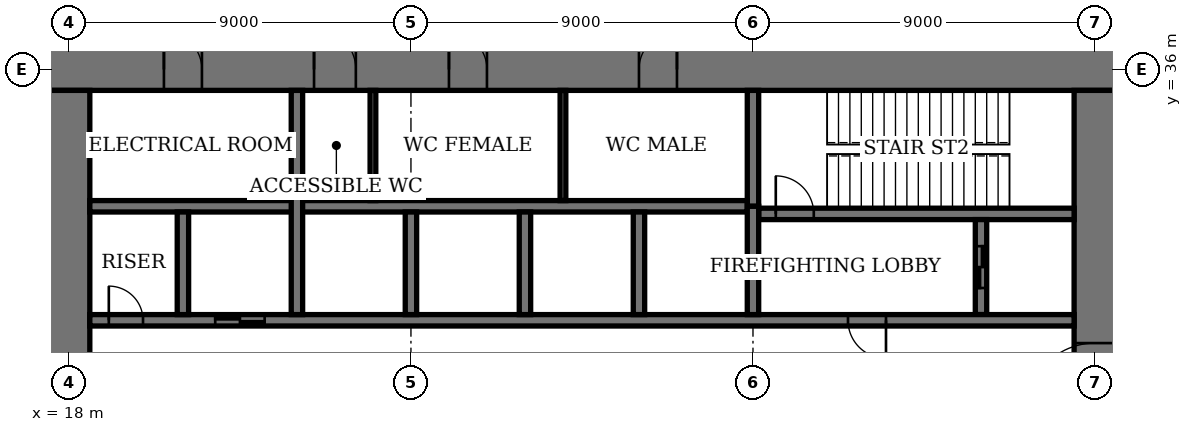
"""IFC4 building model, lengths in metres.
Left out: names, types, materials, properties, quantities, classifications, styles, units other than length and angle.
Written with IfcOpenShell. Run it as: python <this file> out.ifc"""

import sys

from ifc_helpers import new_model, si_unit, direction, frame, frame_2d, origin, place, context, subcontext, project, spatial, rectangle, extrude, element, fill, save


model = new_model("IFC4")
c1 = context("Model", 3, precision=1e-05, world=origin(), true_north=direction((0.0, 1.0)))
c2 = subcontext(c1, "Body", "Model", "MODEL_VIEW")
j1 = project(units=[si_unit("LENGTHUNIT", "METRE"), si_unit("PLANEANGLEUNIT", "RADIAN")], contexts=[c1])
p1 = place(None, origin())
s1 = spatial("IfcSite", under=j1, at=p1, CompositionType="ELEMENT")
p2 = place(p1, origin())
s2 = spatial("IfcBuilding", under=s1, at=p2, CompositionType="ELEMENT")
p3 = place(p2, frame((0.0, 0.0, 80.0)))
s3 = spatial("IfcBuildingStorey", under=s2, at=p3, CompositionType="ELEMENT", Elevation=80.0)
p4 = place(p3, frame((45.55, 36.0, 0.0), z_axis=(0.0, 0.0, 1.0), x_axis=(-1.0, 0.0, 0.0)))
e1 = element("IfcWall", 1, at=p4, inside=s3, PredefinedType="SHEAR", context=c2, shape_type="SweptSolid", body=[
    extrude(rectangle(XDim=28.1, YDim=1.1, at=frame_2d((14.05, 0.0))), origin(), (0.0, 0.0, 1.0), 5.0),
])
p5 = place(p4, frame((11.55, 0.0, 0.0)))
e2 = element("IfcOpeningElement", 2, at=p5, cuts=e1, PredefinedType="OPENING", context=c2, shape_type="SweptSolid", body=[
    extrude(rectangle(XDim=1.0, YDim=2.4, at=frame_2d((0.5, 1.2))), frame((0.0, 0.56, 0.0), z_axis=(0.0, -1.0, 0.0), x_axis=(1.0, 0.0, 0.0)), (0.0, 0.0, 1.0), 1.12),
])
p6 = place(p4, frame((16.55, 0.0, 0.0)))
e3 = element("IfcOpeningElement", 3, at=p6, cuts=e1, PredefinedType="OPENING", context=c2, shape_type="SweptSolid", body=[
    extrude(rectangle(XDim=1.0, YDim=2.4, at=frame_2d((0.5, 1.2))), frame((0.0, 0.56, 0.0), z_axis=(0.0, -1.0, 0.0), x_axis=(1.0, 0.0, 0.0)), (0.0, 0.0, 1.0), 1.12),
])
p7 = place(p4, frame((20.0, 0.0, 0.0)))
e4 = element("IfcOpeningElement", 4, at=p7, cuts=e1, PredefinedType="OPENING", context=c2, shape_type="SweptSolid", body=[
    extrude(rectangle(XDim=1.1, YDim=2.4, at=frame_2d((0.55, 1.2))), frame((0.0, 0.56, 0.0), z_axis=(0.0, -1.0, 0.0), x_axis=(1.0, 0.0, 0.0)), (0.0, 0.0, 1.0), 1.12),
])
p8 = place(p4, frame((24.05, 0.0, 0.0)))
e5 = element("IfcOpeningElement", 5, at=p8, cuts=e1, PredefinedType="OPENING", context=c2, shape_type="SweptSolid", body=[
    extrude(rectangle(XDim=1.0, YDim=2.4, at=frame_2d((0.5, 1.2))), frame((0.0, 0.56, 0.0), z_axis=(0.0, -1.0, 0.0), x_axis=(1.0, 0.0, 0.0)), (0.0, 0.0, 1.0), 1.12),
])
p9 = place(p3, frame((18.0, 35.45, 0.0), z_axis=(0.0, 0.0, 1.0), x_axis=(0.0, -1.0, 0.0)))
e6 = element("IfcWall", 6, at=p9, inside=s3, PredefinedType="SHEAR", context=c2, shape_type="SweptSolid", body=[
    extrude(rectangle(XDim=16.9, YDim=1.1, at=frame_2d((8.45, 0.0))), origin(), (0.0, 0.0, 1.0), 5.0),
])
p10 = place(p9, frame((8.45, 0.0, 0.0)))
e7 = element("IfcOpeningElement", 7, at=p10, cuts=e6, PredefinedType="OPENING", context=c2, shape_type="SweptSolid", body=[
    extrude(rectangle(XDim=1.8, YDim=2.4, at=frame_2d((0.9, 1.2))), frame((0.0, 0.56, 0.0), z_axis=(0.0, -1.0, 0.0), x_axis=(1.0, 0.0, 0.0)), (0.0, 0.0, 1.0), 1.12),
])
p11 = place(p3, frame((45.0, 18.55, 0.0), z_axis=(0.0, 0.0, 1.0), x_axis=(0.0, 1.0, 0.0)))
e8 = element("IfcWall", 8, at=p11, inside=s3, PredefinedType="SHEAR", context=c2, shape_type="SweptSolid", body=[
    extrude(rectangle(XDim=16.9, YDim=1.1, at=frame_2d((8.45, 0.0))), origin(), (0.0, 0.0, 1.0), 5.0),
])
p12 = place(p11, frame((8.45, 0.0, 0.0)))
e9 = element("IfcOpeningElement", 9, at=p12, cuts=e8, PredefinedType="OPENING", context=c2, shape_type="SweptSolid", body=[
    extrude(rectangle(XDim=1.8, YDim=2.4, at=frame_2d((0.9, 1.2))), frame((0.0, 0.56, 0.0), z_axis=(0.0, -1.0, 0.0), x_axis=(1.0, 0.0, 0.0)), (0.0, 0.0, 1.0), 1.12),
])
p13 = place(p3, frame((36.15, 32.2, 0.0), z_axis=(0.0, 0.0, 1.0), x_axis=(1.0, 0.0, 0.0)))
e10 = element("IfcWall", 10, at=p13, inside=s3, PredefinedType="SHEAR", context=c2, shape_type="SweptSolid", body=[
    extrude(rectangle(XDim=8.3, YDim=0.3, at=frame_2d((4.15, 0.0))), origin(), (0.0, 0.0, 1.0), 5.0),
])
p14 = place(p13, frame((0.45, 0.0, 0.0)))
e11 = element("IfcOpeningElement", 11, at=p14, cuts=e10, PredefinedType="OPENING", context=c2, shape_type="SweptSolid", body=[
    extrude(rectangle(XDim=1.0, YDim=2.4, at=frame_2d((0.5, 1.2))), frame((0.0, 0.16, 0.0), z_axis=(0.0, -1.0, 0.0), x_axis=(1.0, 0.0, 0.0)), (0.0, 0.0, 1.0), 0.32),
])
p15 = place(p3, frame((36.0, 32.4, 0.0), z_axis=(0.0, 0.0, 1.0), x_axis=(0.0, 1.0, 0.0)))
e12 = element("IfcWall", 12, at=p15, inside=s3, PredefinedType="SHEAR", context=c2, shape_type="SweptSolid", body=[
    extrude(rectangle(XDim=3.05, YDim=0.3, at=frame_2d((1.525, 0.0))), origin(), (0.0, 0.0, 1.0), 5.0),
])
p16 = place(p3, frame((42.0, 29.55, 0.0), z_axis=(0.0, 0.0, 1.0), x_axis=(0.0, 1.0, 0.0)))
e13 = element("IfcWall", 13, at=p16, inside=s3, PredefinedType="SHEAR", context=c2, shape_type="SweptSolid", body=[
    extrude(rectangle(XDim=2.5, YDim=0.3, at=frame_2d((1.25, 0.0))), origin(), (0.0, 0.0, 1.0), 5.0),
])
p17 = place(p16, frame((0.7, 0.0, 0.0)))
e14 = element("IfcOpeningElement", 14, at=p17, cuts=e13, PredefinedType="OPENING", context=c2, shape_type="SweptSolid", body=[
    extrude(rectangle(XDim=1.1, YDim=2.4, at=frame_2d((0.55, 1.2))), frame((0.0, 0.16, 0.0), z_axis=(0.0, -1.0, 0.0), x_axis=(1.0, 0.0, 0.0)), (0.0, 0.0, 1.0), 0.32),
])
p18 = place(p3, frame((18.55, 29.4, 0.0), z_axis=(0.0, 0.0, 1.0), x_axis=(1.0, 0.0, 0.0)))
e15 = element("IfcWall", 15, at=p18, inside=s3, PredefinedType="SHEAR", context=c2, shape_type="SweptSolid", body=[
    extrude(rectangle(XDim=25.9, YDim=0.3, at=frame_2d((12.95, 0.0))), origin(), (0.0, 0.0, 1.0), 5.0),
])
p19 = place(p18, frame((19.95, 0.0, 0.0)))
e16 = element("IfcOpeningElement", 16, at=p19, cuts=e15, PredefinedType="OPENING", context=c2, shape_type="SweptSolid", body=[
    extrude(rectangle(XDim=1.0, YDim=2.4, at=frame_2d((0.5, 1.2))), frame((0.0, 0.16, 0.0), z_axis=(0.0, -1.0, 0.0), x_axis=(1.0, 0.0, 0.0)), (0.0, 0.0, 1.0), 0.32),
])
p20 = place(p18, frame((0.5, 0.0, 0.0)))
e17 = element("IfcOpeningElement", 17, at=p20, cuts=e15, PredefinedType="OPENING", context=c2, shape_type="SweptSolid", body=[
    extrude(rectangle(XDim=0.9, YDim=2.1, at=frame_2d((0.45, 1.05))), frame((0.0, 0.16, 0.0), z_axis=(0.0, -1.0, 0.0), x_axis=(1.0, 0.0, 0.0)), (0.0, 0.0, 1.0), 0.32),
])
p21 = place(p18, frame((3.3, 0.0, 0.0)))
e18 = element("IfcOpeningElement", 18, at=p21, cuts=e15, PredefinedType="OPENING", context=c2, shape_type="SweptSolid", body=[
    extrude(rectangle(XDim=1.3, YDim=2.4, at=frame_2d((0.65, 1.2))), frame((0.0, 0.16, 0.0), z_axis=(0.0, -1.0, 0.0), x_axis=(1.0, 0.0, 0.0)), (0.0, 0.0, 1.0), 0.32),
])
p22 = place(p3, frame((18.55, 32.4, 0.0), z_axis=(0.0, 0.0, 1.0), x_axis=(1.0, 0.0, 0.0)))
e19 = element("IfcWall", 19, at=p22, inside=s3, PredefinedType="SHEAR", context=c2, shape_type="SweptSolid", body=[
    extrude(rectangle(XDim=17.3, YDim=0.3, at=frame_2d((8.65, 0.0))), origin(), (0.0, 0.0, 1.0), 5.0),
])
for number, where, z_axis, x_axis in (
    (20, (33.0, 29.55, 0.0), (0.0, 0.0, 1.0), (0.0, 1.0, 0.0)),
    (21, (30.0, 29.55, 0.0), (0.0, 0.0, 1.0), (0.0, 1.0, 0.0)),
    (22, (27.0, 29.55, 0.0), (0.0, 0.0, 1.0), (0.0, 1.0, 0.0)),
):
    element("IfcWall", number, at=place(p3, frame(where, z_axis=z_axis, x_axis=x_axis)), inside=s3, PredefinedType="SHEAR", context=c2, shape_type="SweptSolid", body=[
        extrude(rectangle(XDim=2.7, YDim=0.3, at=frame_2d((1.35, 0.0))), origin(), (0.0, 0.0, 1.0), 5.0),
    ])
p23 = place(p3, frame((24.0, 29.55, 0.0), z_axis=(0.0, 0.0, 1.0), x_axis=(0.0, 1.0, 0.0)))
e23 = element("IfcWall", 23, at=p23, inside=s3, PredefinedType="SHEAR", context=c2, shape_type="SweptSolid", body=[
    extrude(rectangle(XDim=5.9, YDim=0.3, at=frame_2d((2.95, 0.0))), origin(), (0.0, 0.0, 1.0), 5.0),
])
p24 = place(p3, frame((21.0, 29.55, 0.0), z_axis=(0.0, 0.0, 1.0), x_axis=(0.0, 1.0, 0.0)))
e24 = element("IfcWall", 24, at=p24, inside=s3, PredefinedType="SHEAR", context=c2, shape_type="SweptSolid", body=[
    extrude(rectangle(XDim=2.7, YDim=0.3, at=frame_2d((1.35, 0.0))), origin(), (0.0, 0.0, 1.0), 5.0),
])
p25 = place(p3, frame((36.0, 29.55, 0.0), z_axis=(0.0, 0.0, 1.0), x_axis=(0.0, 1.0, 0.0)))
e25 = element("IfcWall", 25, at=p25, inside=s3, PredefinedType="SHEAR", context=c2, shape_type="SweptSolid", body=[
    extrude(rectangle(XDim=2.85, YDim=0.3, at=frame_2d((1.425, 0.0))), origin(), (0.0, 0.0, 1.0), 5.0),
])
for number, where, z_axis, x_axis in (
    (26, (31.0, 32.55, 0.0), (0.0, 0.0, 1.0), (0.0, 1.0, 0.0)),
    (27, (26.0, 32.55, 0.0), (0.0, 0.0, 1.0), (0.0, 1.0, 0.0)),
):
    element("IfcWall", number, at=place(p3, frame(where, z_axis=z_axis, x_axis=x_axis)), inside=s3, PredefinedType="PARTITIONING", context=c2, shape_type="SweptSolid", body=[
        extrude(rectangle(XDim=2.9, YDim=0.15, at=frame_2d((1.45, 0.0))), origin(), (0.0, 0.0, 1.0), 4.6),
    ])
p26 = place(p12, origin())
e28 = element("IfcDoor", 28, at=p26, inside=s3, OperationType="DOUBLE_DOOR_DOUBLE_SWING", PredefinedType="DOOR", context=c2, shape_type="SweptSolid", body=[
    extrude(rectangle(XDim=1.8, YDim=2.4, at=frame_2d((0.9, 1.2))), frame((0.0, 0.03, 0.0), z_axis=(0.0, -1.0, 0.0), x_axis=(1.0, 0.0, 0.0)), (0.0, 0.0, 1.0), 0.06),
    extrude(rectangle(XDim=0.04, YDim=2.4, at=frame_2d((0.02, 1.2))), frame((0.0, 0.55, 0.0), z_axis=(0.0, -1.0, 0.0), x_axis=(1.0, 0.0, 0.0)), (0.0, 0.0, 1.0), 1.1),
    extrude(rectangle(XDim=0.04, YDim=2.4, at=frame_2d((1.78, 1.2))), frame((0.0, 0.55, 0.0), z_axis=(0.0, -1.0, 0.0), x_axis=(1.0, 0.0, 0.0)), (0.0, 0.0, 1.0), 1.1),
    extrude(rectangle(XDim=1.8, YDim=0.04, at=frame_2d((0.9, 2.38))), frame((0.0, 0.55, 0.0), z_axis=(0.0, -1.0, 0.0), x_axis=(1.0, 0.0, 0.0)), (0.0, 0.0, 1.0), 1.1),
])
fill(e9, e28)
p27 = place(p5, origin())
e29 = element("IfcDoor", 29, at=p27, inside=s3, OperationType="SINGLE_SWING_LEFT", PredefinedType="DOOR", context=c2, shape_type="SweptSolid", body=[
    extrude(rectangle(XDim=1.0, YDim=2.4, at=frame_2d((0.5, 1.2))), frame((0.0, 0.025, 0.0), z_axis=(0.0, -1.0, 0.0), x_axis=(1.0, 0.0, 0.0)), (0.0, 0.0, 1.0), 0.05),
    extrude(rectangle(XDim=0.04, YDim=2.4, at=frame_2d((0.02, 1.2))), frame((0.0, 0.4, 0.0), z_axis=(0.0, -1.0, 0.0), x_axis=(1.0, 0.0, 0.0)), (0.0, 0.0, 1.0), 0.8),
    extrude(rectangle(XDim=0.04, YDim=2.4, at=frame_2d((0.98, 1.2))), frame((0.0, 0.4, 0.0), z_axis=(0.0, -1.0, 0.0), x_axis=(1.0, 0.0, 0.0)), (0.0, 0.0, 1.0), 0.8),
    extrude(rectangle(XDim=1.0, YDim=0.04, at=frame_2d((0.5, 2.38))), frame((0.0, 0.4, 0.0), z_axis=(0.0, -1.0, 0.0), x_axis=(1.0, 0.0, 0.0)), (0.0, 0.0, 1.0), 0.8),
])
fill(e2, e29)
p28 = place(p6, origin())
e30 = element("IfcDoor", 30, at=p28, inside=s3, OperationType="SINGLE_SWING_RIGHT", PredefinedType="DOOR", context=c2, shape_type="SweptSolid", body=[
    extrude(rectangle(XDim=1.0, YDim=2.4, at=frame_2d((0.5, 1.2))), frame((0.0, 0.025, 0.0), z_axis=(0.0, -1.0, 0.0), x_axis=(1.0, 0.0, 0.0)), (0.0, 0.0, 1.0), 0.05),
    extrude(rectangle(XDim=0.04, YDim=2.4, at=frame_2d((0.02, 1.2))), frame((0.0, 0.4, 0.0), z_axis=(0.0, -1.0, 0.0), x_axis=(1.0, 0.0, 0.0)), (0.0, 0.0, 1.0), 0.8),
    extrude(rectangle(XDim=0.04, YDim=2.4, at=frame_2d((0.98, 1.2))), frame((0.0, 0.4, 0.0), z_axis=(0.0, -1.0, 0.0), x_axis=(1.0, 0.0, 0.0)), (0.0, 0.0, 1.0), 0.8),
    extrude(rectangle(XDim=1.0, YDim=0.04, at=frame_2d((0.5, 2.38))), frame((0.0, 0.4, 0.0), z_axis=(0.0, -1.0, 0.0), x_axis=(1.0, 0.0, 0.0)), (0.0, 0.0, 1.0), 0.8),
])
fill(e3, e30)
p29 = place(p7, origin())
e31 = element("IfcDoor", 31, at=p29, inside=s3, OperationType="SINGLE_SWING_RIGHT", PredefinedType="DOOR", context=c2, shape_type="SweptSolid", body=[
    extrude(rectangle(XDim=1.1, YDim=2.4, at=frame_2d((0.55, 1.2))), frame((0.0, 0.025, 0.0), z_axis=(0.0, -1.0, 0.0), x_axis=(1.0, 0.0, 0.0)), (0.0, 0.0, 1.0), 0.05),
    extrude(rectangle(XDim=0.04, YDim=2.4, at=frame_2d((0.02, 1.2))), frame((0.0, 0.44, 0.0), z_axis=(0.0, -1.0, 0.0), x_axis=(1.0, 0.0, 0.0)), (0.0, 0.0, 1.0), 0.88),
    extrude(rectangle(XDim=0.04, YDim=2.4, at=frame_2d((1.08, 1.2))), frame((0.0, 0.44, 0.0), z_axis=(0.0, -1.0, 0.0), x_axis=(1.0, 0.0, 0.0)), (0.0, 0.0, 1.0), 0.88),
    extrude(rectangle(XDim=1.1, YDim=0.04, at=frame_2d((0.55, 2.38))), frame((0.0, 0.44, 0.0), z_axis=(0.0, -1.0, 0.0), x_axis=(1.0, 0.0, 0.0)), (0.0, 0.0, 1.0), 0.88),
])
fill(e4, e31)
p30 = place(p8, origin())
e32 = element("IfcDoor", 32, at=p30, inside=s3, OperationType="SINGLE_SWING_RIGHT", PredefinedType="DOOR", context=c2, shape_type="SweptSolid", body=[
    extrude(rectangle(XDim=1.0, YDim=2.4, at=frame_2d((0.5, 1.2))), frame((0.0, 0.025, 0.0), z_axis=(0.0, -1.0, 0.0), x_axis=(1.0, 0.0, 0.0)), (0.0, 0.0, 1.0), 0.05),
    extrude(rectangle(XDim=0.04, YDim=2.4, at=frame_2d((0.02, 1.2))), frame((0.0, 0.4, 0.0), z_axis=(0.0, -1.0, 0.0), x_axis=(1.0, 0.0, 0.0)), (0.0, 0.0, 1.0), 0.8),
    extrude(rectangle(XDim=0.04, YDim=2.4, at=frame_2d((0.98, 1.2))), frame((0.0, 0.4, 0.0), z_axis=(0.0, -1.0, 0.0), x_axis=(1.0, 0.0, 0.0)), (0.0, 0.0, 1.0), 0.8),
    extrude(rectangle(XDim=1.0, YDim=0.04, at=frame_2d((0.5, 2.38))), frame((0.0, 0.4, 0.0), z_axis=(0.0, -1.0, 0.0), x_axis=(1.0, 0.0, 0.0)), (0.0, 0.0, 1.0), 0.8),
])
fill(e5, e32)
p31 = place(p14, origin())
e33 = element("IfcDoor", 33, at=p31, inside=s3, OperationType="SINGLE_SWING_RIGHT", PredefinedType="DOOR", context=c2, shape_type="SweptSolid", body=[
    extrude(rectangle(XDim=1.0, YDim=2.4, at=frame_2d((0.5, 1.2))), frame((0.0, 0.03, 0.0), z_axis=(0.0, -1.0, 0.0), x_axis=(1.0, 0.0, 0.0)), (0.0, 0.0, 1.0), 0.06),
])
fill(e11, e33)
p32 = place(p19, origin())
e34 = element("IfcDoor", 34, at=p32, inside=s3, OperationType="SINGLE_SWING_RIGHT", PredefinedType="DOOR", context=c2, shape_type="SweptSolid", body=[
    extrude(rectangle(XDim=1.0, YDim=2.4, at=frame_2d((0.5, 1.2))), frame((0.0, 0.03, 0.0), z_axis=(0.0, -1.0, 0.0), x_axis=(1.0, 0.0, 0.0)), (0.0, 0.0, 1.0), 0.06),
])
fill(e16, e34)
p33 = place(p20, origin())
e35 = element("IfcDoor", 35, at=p33, inside=s3, OperationType="SINGLE_SWING_RIGHT", PredefinedType="DOOR", context=c2, shape_type="SweptSolid", body=[
    extrude(rectangle(XDim=0.9, YDim=2.1, at=frame_2d((0.45, 1.05))), frame((0.0, 0.03, 0.0), z_axis=(0.0, -1.0, 0.0), x_axis=(1.0, 0.0, 0.0)), (0.0, 0.0, 1.0), 0.06),
])
fill(e17, e35)
p34 = place(p21, origin())
e36 = element("IfcDoor", 36, at=p34, inside=s3, OperationType="DOUBLE_DOOR_SLIDING", PredefinedType="DOOR", context=c2, shape_type="SweptSolid", body=[
    extrude(rectangle(XDim=1.3, YDim=2.4, at=frame_2d((0.65, 1.2))), frame((0.0, 0.02, 0.0), z_axis=(0.0, -1.0, 0.0), x_axis=(1.0, 0.0, 0.0)), (0.0, 0.0, 1.0), 0.04),
])
fill(e18, e36)
p35 = place(p17, origin())
e37 = element("IfcDoor", 37, at=p35, inside=s3, OperationType="DOUBLE_DOOR_SLIDING", PredefinedType="DOOR", context=c2, shape_type="SweptSolid", body=[
    extrude(rectangle(XDim=1.1, YDim=2.4, at=frame_2d((0.55, 1.2))), frame((0.0, 0.03, 0.0), z_axis=(0.0, -1.0, 0.0), x_axis=(1.0, 0.0, 0.0)), (0.0, 0.0, 1.0), 0.06),
])
fill(e14, e37)
save(model, sys.argv[1])
